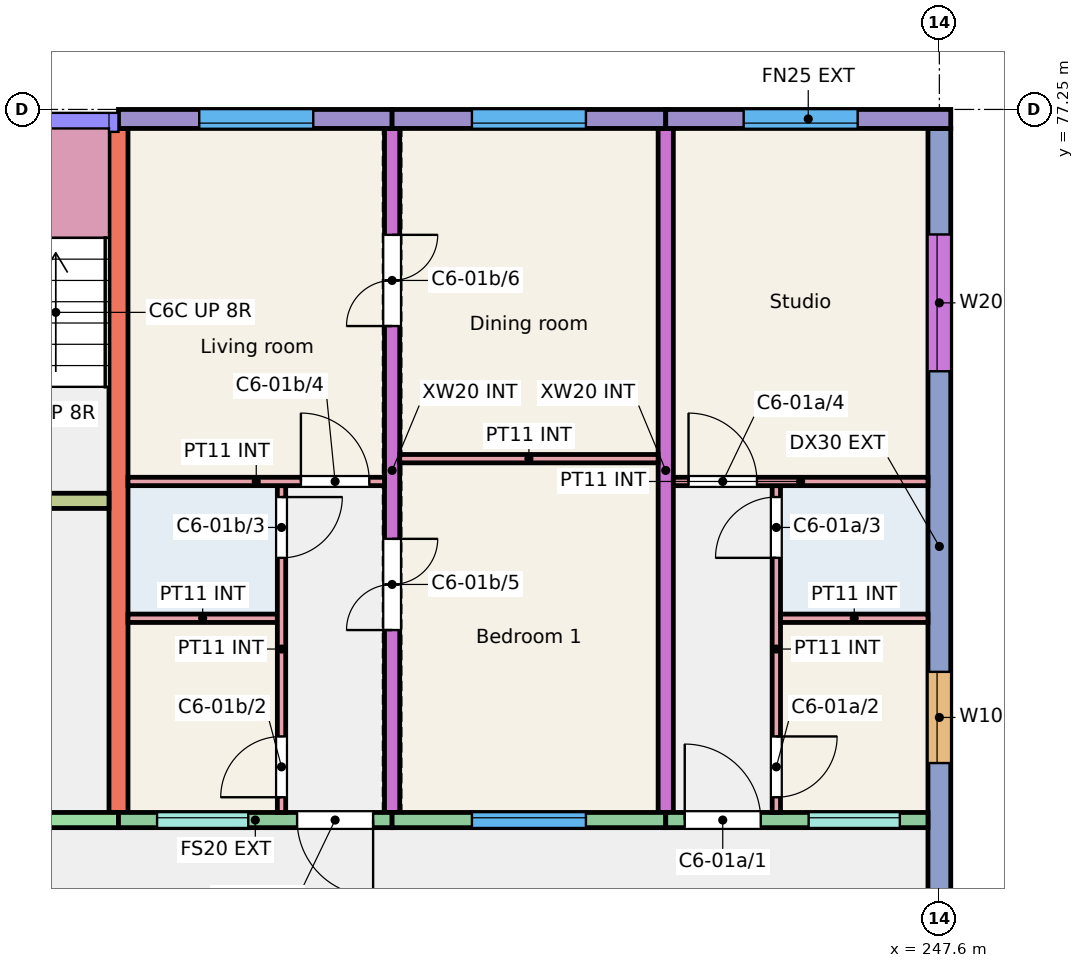
"""IFC4 building model, lengths in metres.
Left out: names, types, materials, properties, quantities, classifications, styles, units other than length and angle.
Written with IfcOpenShell. Run it as: python <this file> out.ifc"""

import sys

from ifc_helpers import new_model, si_unit, direction, frame, frame_2d, origin, place, context, subcontext, project, spatial, rectangle, extrude, element, fill, save


model = new_model("IFC4")
c1 = context("Model", 3, precision=1e-05, world=origin(), true_north=direction((0.0, 1.0)))
c2 = subcontext(c1, "Body", "Model", "MODEL_VIEW")
j1 = project(units=[si_unit("LENGTHUNIT", "METRE"), si_unit("PLANEANGLEUNIT", "RADIAN")], contexts=[c1])
p1 = place(None, origin())
s1 = spatial("IfcSite", under=j1, at=p1, CompositionType="ELEMENT")
p2 = place(p1, origin())
s2 = spatial("IfcBuilding", under=s1, at=p2, CompositionType="ELEMENT")
p3 = place(p2, frame((0.0, 0.0, 3.0)))
s3 = spatial("IfcBuildingStorey", under=s2, at=p3, CompositionType="ELEMENT", Elevation=3.0)
p4 = place(p3, frame((236.8, 68.0, 0.0), z_axis=(0.0, 0.0, 1.0), x_axis=(0.0, 1.0, 0.0)))
e1 = element("IfcWall", 1, at=p4, inside=s3, PredefinedType="SHEAR", context=c2, shape_type="SweptSolid", body=[
    extrude(rectangle(XDim=9.0, YDim=0.25, at=frame_2d((4.5, 0.0))), origin(), (0.0, 0.0, 1.0), 3.0),
])
p5 = place(p3, frame((240.4, 68.0, 0.0), z_axis=(0.0, 0.0, 1.0), x_axis=(0.0, 1.0, 0.0)))
e2 = element("IfcWall", 2, at=p5, inside=s3, PredefinedType="SHEAR", context=c2, shape_type="SweptSolid", body=[
    extrude(rectangle(XDim=9.0, YDim=0.2, at=frame_2d((4.5, 0.0))), origin(), (0.0, 0.0, 1.0), 3.0),
])
p6 = place(p5, frame((2.4, 0.0, 0.0)))
e3 = element("IfcOpeningElement", 3, at=p6, cuts=e2, PredefinedType="OPENING", context=c2, shape_type="SweptSolid", body=[
    extrude(rectangle(XDim=1.2, YDim=2.1, at=frame_2d((0.6, 1.05))), frame((0.0, 0.11, 0.0), z_axis=(0.0, -1.0, 0.0), x_axis=(1.0, 0.0, 0.0)), (0.0, 0.0, 1.0), 0.22),
])
p7 = place(p5, frame((6.4, 0.0, 0.0)))
e4 = element("IfcOpeningElement", 4, at=p7, cuts=e2, PredefinedType="OPENING", context=c2, shape_type="SweptSolid", body=[
    extrude(rectangle(XDim=1.2, YDim=2.1, at=frame_2d((0.6, 1.05))), frame((0.0, 0.11, 0.0), z_axis=(0.0, -1.0, 0.0), x_axis=(1.0, 0.0, 0.0)), (0.0, 0.0, 1.0), 0.22),
])
p8 = place(p3, frame((244.0, 68.0, 0.0), z_axis=(0.0, 0.0, 1.0), x_axis=(0.0, 1.0, 0.0)))
e5 = element("IfcWall", 5, at=p8, inside=s3, PredefinedType="SHEAR", context=c2, shape_type="SweptSolid", body=[
    extrude(rectangle(XDim=9.0, YDim=0.2, at=frame_2d((4.5, 0.0))), origin(), (0.0, 0.0, 1.0), 3.0),
])
p9 = place(p3, frame((247.6, 66.0, 0.0), z_axis=(0.0, 0.0, 1.0), x_axis=(0.0, 1.0, 0.0)))
e6 = element("IfcWall", 6, at=p9, inside=s3, PredefinedType="SHEAR", context=c2, shape_type="SweptSolid", body=[
    extrude(rectangle(XDim=11.0, YDim=0.3, at=frame_2d((5.5, 0.0))), origin(), (0.0, 0.0, 1.0), 3.0),
])
p10 = place(p9, frame((2.65, 0.0, 0.9)))
e7 = element("IfcOpeningElement", 7, at=p10, cuts=e6, PredefinedType="OPENING", context=c2, shape_type="SweptSolid", body=[
    extrude(rectangle(XDim=1.2, YDim=1.5, at=frame_2d((0.6, 0.75))), frame((0.0, 0.16, 0.0), z_axis=(0.0, -1.0, 0.0), x_axis=(1.0, 0.0, 0.0)), (0.0, 0.0, 1.0), 0.32),
])
p11 = place(p9, frame((7.805, 0.0, 0.9)))
e8 = element("IfcOpeningElement", 8, at=p11, cuts=e6, PredefinedType="OPENING", context=c2, shape_type="SweptSolid", body=[
    extrude(rectangle(XDim=1.8, YDim=1.5, at=frame_2d((0.9, 0.75))), frame((0.0, 0.16, 0.0), z_axis=(0.0, -1.0, 0.0), x_axis=(1.0, 0.0, 0.0)), (0.0, 0.0, 1.0), 0.32),
])
p12 = place(p3, frame((230.95, 67.9, 0.0), z_axis=(0.0, 0.0, 1.0), x_axis=(1.0, 0.0, 0.0)))
e9 = element("IfcWall", 9, at=p12, inside=s3, PredefinedType="SHEAR", context=c2, shape_type="SweptSolid", body=[
    extrude(rectangle(XDim=5.85, YDim=0.2, at=frame_2d((2.925, 0.0))), origin(), (0.0, 0.0, 1.0), 3.0),
])
p13 = place(p12, frame((2.312, 0.0, 0.0)))
e10 = element("IfcOpeningElement", 10, at=p13, cuts=e9, PredefinedType="OPENING", context=c2, shape_type="SweptSolid", body=[
    extrude(rectangle(XDim=1.1, YDim=2.1, at=frame_2d((0.55, 1.05))), frame((0.0, 0.11, 0.0), z_axis=(0.0, -1.0, 0.0), x_axis=(1.0, 0.0, 0.0)), (0.0, 0.0, 1.0), 0.22),
])
p14 = place(p3, frame((230.95, 72.1, 0.0), z_axis=(0.0, 0.0, 1.0), x_axis=(1.0, 0.0, 0.0)))
e11 = element("IfcWall", 11, at=p14, inside=s3, PredefinedType="SHEAR", context=c2, shape_type="SweptSolid", body=[
    extrude(rectangle(XDim=5.725, YDim=0.2, at=frame_2d((2.863, 0.0))), origin(), (0.0, 0.0, 1.0), 3.0),
])
p15 = place(p14, frame((3.775, 0.0, 0.0)))
e12 = element("IfcOpeningElement", 12, at=p15, cuts=e11, PredefinedType="OPENING", context=c2, shape_type="SweptSolid", body=[
    extrude(rectangle(XDim=1.0, YDim=2.1, at=frame_2d((0.5, 1.05))), frame((0.0, 0.11, 0.0), z_axis=(0.0, -1.0, 0.0), x_axis=(1.0, 0.0, 0.0)), (0.0, 0.0, 1.0), 0.22),
])
p16 = place(p14, frame((0.762, 0.0, 0.0)))
e13 = element("IfcOpeningElement", 13, at=p16, cuts=e11, PredefinedType="OPENING", context=c2, shape_type="SweptSolid", body=[
    extrude(rectangle(XDim=1.1, YDim=2.1, at=frame_2d((0.55, 1.05))), frame((0.0, 0.11, 0.0), z_axis=(0.0, -1.0, 0.0), x_axis=(1.0, 0.0, 0.0)), (0.0, 0.0, 1.0), 0.22),
])
p17 = place(p3, frame((236.8, 77.125, 0.0), z_axis=(0.0, 0.0, 1.0), x_axis=(1.0, 0.0, 0.0)))
e14 = element("IfcWall", 14, at=p17, inside=s3, PredefinedType="SOLIDWALL", context=c2, shape_type="SweptSolid", body=[
    extrude(rectangle(XDim=3.6, YDim=0.25, at=frame_2d((1.8, 0.0))), origin(), (0.0, 0.0, 1.0), 3.0),
])
p18 = place(p17, frame((1.062, 0.0, 0.9)))
e15 = element("IfcOpeningElement", 15, at=p18, cuts=e14, PredefinedType="OPENING", context=c2, shape_type="SweptSolid", body=[
    extrude(rectangle(XDim=1.5, YDim=1.5, at=frame_2d((0.75, 0.75))), frame((0.0, 0.135, 0.0), z_axis=(0.0, -1.0, 0.0), x_axis=(1.0, 0.0, 0.0)), (0.0, 0.0, 1.0), 0.27),
])
p19 = place(p3, frame((236.8, 67.9, 0.0), z_axis=(0.0, 0.0, 1.0), x_axis=(1.0, 0.0, 0.0)))
e16 = element("IfcWall", 16, at=p19, inside=s3, PredefinedType="SOLIDWALL", context=c2, shape_type="SweptSolid", body=[
    extrude(rectangle(XDim=3.6, YDim=0.2, at=frame_2d((1.8, 0.0))), origin(), (0.0, 0.0, 1.0), 3.0),
])
p20 = place(p19, frame((0.508, 0.0, 1.1)))
e17 = element("IfcOpeningElement", 17, at=p20, cuts=e16, PredefinedType="OPENING", context=c2, shape_type="SweptSolid", body=[
    extrude(rectangle(XDim=1.2, YDim=1.3, at=frame_2d((0.6, 0.65))), frame((0.0, 0.11, 0.0), z_axis=(0.0, -1.0, 0.0), x_axis=(1.0, 0.0, 0.0)), (0.0, 0.0, 1.0), 0.22),
])
p21 = place(p19, frame((2.35, 0.0, 0.0)))
e18 = element("IfcOpeningElement", 18, at=p21, cuts=e16, PredefinedType="OPENING", context=c2, shape_type="SweptSolid", body=[
    extrude(rectangle(XDim=1.0, YDim=2.1, at=frame_2d((0.5, 1.05))), frame((0.0, 0.11, 0.0), z_axis=(0.0, -1.0, 0.0), x_axis=(1.0, 0.0, 0.0)), (0.0, 0.0, 1.0), 0.22),
])
p22 = place(p3, frame((240.4, 77.125, 0.0), z_axis=(0.0, 0.0, 1.0), x_axis=(1.0, 0.0, 0.0)))
e19 = element("IfcWall", 19, at=p22, inside=s3, PredefinedType="SOLIDWALL", context=c2, shape_type="SweptSolid", body=[
    extrude(rectangle(XDim=3.6, YDim=0.25, at=frame_2d((1.8, 0.0))), origin(), (0.0, 0.0, 1.0), 3.0),
])
p23 = place(p22, frame((1.05, 0.0, 0.9)))
e20 = element("IfcOpeningElement", 20, at=p23, cuts=e19, PredefinedType="OPENING", context=c2, shape_type="SweptSolid", body=[
    extrude(rectangle(XDim=1.5, YDim=1.5, at=frame_2d((0.75, 0.75))), frame((0.0, 0.135, 0.0), z_axis=(0.0, -1.0, 0.0), x_axis=(1.0, 0.0, 0.0)), (0.0, 0.0, 1.0), 0.27),
])
p24 = place(p3, frame((240.4, 67.9, 0.0), z_axis=(0.0, 0.0, 1.0), x_axis=(1.0, 0.0, 0.0)))
e21 = element("IfcWall", 21, at=p24, inside=s3, PredefinedType="SOLIDWALL", context=c2, shape_type="SweptSolid", body=[
    extrude(rectangle(XDim=3.6, YDim=0.2, at=frame_2d((1.8, 0.0))), origin(), (0.0, 0.0, 1.0), 3.0),
])
p25 = place(p24, frame((1.05, 0.0, 0.9)))
e22 = element("IfcOpeningElement", 22, at=p25, cuts=e21, PredefinedType="OPENING", context=c2, shape_type="SweptSolid", body=[
    extrude(rectangle(XDim=1.5, YDim=1.5, at=frame_2d((0.75, 0.75))), frame((0.0, 0.11, 0.0), z_axis=(0.0, -1.0, 0.0), x_axis=(1.0, 0.0, 0.0)), (0.0, 0.0, 1.0), 0.22),
])
p26 = place(p3, frame((244.0, 77.125, 0.0), z_axis=(0.0, 0.0, 1.0), x_axis=(1.0, 0.0, 0.0)))
e23 = element("IfcWall", 23, at=p26, inside=s3, PredefinedType="SOLIDWALL", context=c2, shape_type="SweptSolid", body=[
    extrude(rectangle(XDim=3.75, YDim=0.25, at=frame_2d((1.875, 0.0))), origin(), (0.0, 0.0, 1.0), 3.0),
])
p27 = place(p26, frame((1.025, 0.0, 0.9)))
e24 = element("IfcOpeningElement", 24, at=p27, cuts=e23, PredefinedType="OPENING", context=c2, shape_type="SweptSolid", body=[
    extrude(rectangle(XDim=1.5, YDim=1.5, at=frame_2d((0.75, 0.75))), frame((0.0, 0.135, 0.0), z_axis=(0.0, -1.0, 0.0), x_axis=(1.0, 0.0, 0.0)), (0.0, 0.0, 1.0), 0.27),
])
p28 = place(p3, frame((244.0, 67.9, 0.0), z_axis=(0.0, 0.0, 1.0), x_axis=(1.0, 0.0, 0.0)))
e25 = element("IfcWall", 25, at=p28, inside=s3, PredefinedType="SOLIDWALL", context=c2, shape_type="SweptSolid", body=[
    extrude(rectangle(XDim=3.45, YDim=0.2, at=frame_2d((1.725, 0.0))), origin(), (0.0, 0.0, 1.0), 3.0),
])
p29 = place(p28, frame((1.88, 0.0, 1.1)))
e26 = element("IfcOpeningElement", 26, at=p29, cuts=e25, PredefinedType="OPENING", context=c2, shape_type="SweptSolid", body=[
    extrude(rectangle(XDim=1.2, YDim=1.3, at=frame_2d((0.6, 0.65))), frame((0.0, 0.11, 0.0), z_axis=(0.0, -1.0, 0.0), x_axis=(1.0, 0.0, 0.0)), (0.0, 0.0, 1.0), 0.22),
])
p30 = place(p28, frame((0.25, 0.0, 0.0)))
e27 = element("IfcOpeningElement", 27, at=p30, cuts=e25, PredefinedType="OPENING", context=c2, shape_type="SweptSolid", body=[
    extrude(rectangle(XDim=1.0, YDim=2.1, at=frame_2d((0.5, 1.05))), frame((0.0, 0.11, 0.0), z_axis=(0.0, -1.0, 0.0), x_axis=(1.0, 0.0, 0.0)), (0.0, 0.0, 1.0), 0.22),
])
p31 = place(p3, frame((245.455, 68.0, 0.0), z_axis=(0.0, 0.0, 1.0), x_axis=(0.0, 1.0, 0.0)))
e28 = element("IfcWall", 28, at=p31, inside=s3, PredefinedType="PARTITIONING", context=c2, shape_type="SweptSolid", body=[
    extrude(rectangle(XDim=4.3, YDim=0.11, at=frame_2d((2.15, 0.0))), origin(), (0.0, 0.0, 1.0), 2.8),
])
p32 = place(p31, frame((0.2, 0.0, 0.0)))
e29 = element("IfcOpeningElement", 29, at=p32, cuts=e28, PredefinedType="OPENING", context=c2, shape_type="SweptSolid", body=[
    extrude(rectangle(XDim=0.8, YDim=2.1, at=frame_2d((0.4, 1.05))), frame((0.0, 0.065, 0.0), z_axis=(0.0, -1.0, 0.0), x_axis=(1.0, 0.0, 0.0)), (0.0, 0.0, 1.0), 0.13),
])
p33 = place(p31, frame((3.35, 0.0, 0.0)))
e30 = element("IfcOpeningElement", 30, at=p33, cuts=e28, PredefinedType="OPENING", context=c2, shape_type="SweptSolid", body=[
    extrude(rectangle(XDim=0.8, YDim=2.1, at=frame_2d((0.4, 1.05))), frame((0.0, 0.065, 0.0), z_axis=(0.0, -1.0, 0.0), x_axis=(1.0, 0.0, 0.0)), (0.0, 0.0, 1.0), 0.13),
])
p34 = place(p3, frame((245.51, 70.555, 0.0), z_axis=(0.0, 0.0, 1.0), x_axis=(1.0, 0.0, 0.0)))
e31 = element("IfcWall", 31, at=p34, inside=s3, PredefinedType="PARTITIONING", context=c2, shape_type="SweptSolid", body=[
    extrude(rectangle(XDim=1.94, YDim=0.11, at=frame_2d((0.97, 0.0))), origin(), (0.0, 0.0, 1.0), 2.8),
])
p35 = place(p3, frame((244.1, 72.355, 0.0), z_axis=(0.0, 0.0, 1.0), x_axis=(1.0, 0.0, 0.0)))
e32 = element("IfcWall", 32, at=p35, inside=s3, PredefinedType="PARTITIONING", context=c2, shape_type="SweptSolid", body=[
    extrude(rectangle(XDim=3.35, YDim=0.11, at=frame_2d((1.675, 0.0))), origin(), (0.0, 0.0, 1.0), 2.8),
])
p36 = place(p35, frame((0.2, 0.0, 0.0)))
e33 = element("IfcOpeningElement", 33, at=p36, cuts=e32, PredefinedType="OPENING", context=c2, shape_type="SweptSolid", body=[
    extrude(rectangle(XDim=0.9, YDim=2.1, at=frame_2d((0.45, 1.05))), frame((0.0, 0.065, 0.0), z_axis=(0.0, -1.0, 0.0), x_axis=(1.0, 0.0, 0.0)), (0.0, 0.0, 1.0), 0.13),
])
p37 = place(p3, frame((236.925, 70.555, 0.0), z_axis=(0.0, 0.0, 1.0), x_axis=(1.0, 0.0, 0.0)))
e34 = element("IfcWall", 34, at=p37, inside=s3, PredefinedType="PARTITIONING", context=c2, shape_type="SweptSolid", body=[
    extrude(rectangle(XDim=1.965, YDim=0.11, at=frame_2d((0.982, 0.0))), origin(), (0.0, 0.0, 1.0), 2.8),
])
p38 = place(p3, frame((238.945, 68.0, 0.0), z_axis=(0.0, 0.0, 1.0), x_axis=(0.0, 1.0, 0.0)))
e35 = element("IfcWall", 35, at=p38, inside=s3, PredefinedType="PARTITIONING", context=c2, shape_type="SweptSolid", body=[
    extrude(rectangle(XDim=4.3, YDim=0.11, at=frame_2d((2.15, 0.0))), origin(), (0.0, 0.0, 1.0), 2.8),
])
p39 = place(p38, frame((0.2, 0.0, 0.0)))
e36 = element("IfcOpeningElement", 36, at=p39, cuts=e35, PredefinedType="OPENING", context=c2, shape_type="SweptSolid", body=[
    extrude(rectangle(XDim=0.8, YDim=2.1, at=frame_2d((0.4, 1.05))), frame((0.0, 0.065, 0.0), z_axis=(0.0, -1.0, 0.0), x_axis=(1.0, 0.0, 0.0)), (0.0, 0.0, 1.0), 0.13),
])
p40 = place(p38, frame((3.35, 0.0, 0.0)))
e37 = element("IfcOpeningElement", 37, at=p40, cuts=e35, PredefinedType="OPENING", context=c2, shape_type="SweptSolid", body=[
    extrude(rectangle(XDim=0.8, YDim=2.1, at=frame_2d((0.4, 1.05))), frame((0.0, 0.065, 0.0), z_axis=(0.0, -1.0, 0.0), x_axis=(1.0, 0.0, 0.0)), (0.0, 0.0, 1.0), 0.13),
])
p41 = place(p3, frame((236.925, 72.355, 0.0), z_axis=(0.0, 0.0, 1.0), x_axis=(1.0, 0.0, 0.0)))
e38 = element("IfcWall", 38, at=p41, inside=s3, PredefinedType="PARTITIONING", context=c2, shape_type="SweptSolid", body=[
    extrude(rectangle(XDim=3.375, YDim=0.11, at=frame_2d((1.688, 0.0))), origin(), (0.0, 0.0, 1.0), 2.8),
])
p42 = place(p41, frame((2.275, 0.0, 0.0)))
e39 = element("IfcOpeningElement", 39, at=p42, cuts=e38, PredefinedType="OPENING", context=c2, shape_type="SweptSolid", body=[
    extrude(rectangle(XDim=0.9, YDim=2.1, at=frame_2d((0.45, 1.05))), frame((0.0, 0.065, 0.0), z_axis=(0.0, -1.0, 0.0), x_axis=(1.0, 0.0, 0.0)), (0.0, 0.0, 1.0), 0.13),
])
p43 = place(p3, frame((240.5, 72.655, 0.0), z_axis=(0.0, 0.0, 1.0), x_axis=(1.0, 0.0, 0.0)))
e40 = element("IfcWall", 40, at=p43, inside=s3, PredefinedType="PARTITIONING", context=c2, shape_type="SweptSolid", body=[
    extrude(rectangle(XDim=3.4, YDim=0.11, at=frame_2d((1.7, 0.0))), origin(), (0.0, 0.0, 1.0), 2.8),
])
p44 = place(p29, origin())
e41 = element("IfcWindow", 41, at=p44, inside=s3, PartitioningType="SINGLE_PANEL", PredefinedType="WINDOW", context=c2, shape_type="SweptSolid", body=[
    extrude(rectangle(XDim=1.2, YDim=1.3, at=frame_2d((0.6, 0.65))), frame((0.0, 0.06, 0.0), z_axis=(0.0, -1.0, 0.0), x_axis=(1.0, 0.0, 0.0)), (0.0, 0.0, 1.0), 0.06),
])
fill(e26, e41)
p45 = place(p27, origin())
e42 = element("IfcWindow", 42, at=p45, inside=s3, PartitioningType="SINGLE_PANEL", PredefinedType="WINDOW", context=c2, shape_type="SweptSolid", body=[
    extrude(rectangle(XDim=1.5, YDim=1.5, at=frame_2d((0.75, 0.75))), frame((0.0, -0.025, 0.0), z_axis=(0.0, -1.0, 0.0), x_axis=(1.0, 0.0, 0.0)), (0.0, 0.0, 1.0), 0.06),
])
fill(e24, e42)
p46 = place(p10, origin())
e43 = element("IfcWindow", 43, at=p46, inside=s3, PartitioningType="SINGLE_PANEL", PredefinedType="WINDOW", context=c2, shape_type="SweptSolid", body=[
    extrude(rectangle(XDim=1.2, YDim=1.5, at=frame_2d((0.6, 0.75))), frame((0.0, 0.06, 0.0), z_axis=(0.0, -1.0, 0.0), x_axis=(1.0, 0.0, 0.0)), (0.0, 0.0, 1.0), 0.06),
])
fill(e7, e43)
p47 = place(p11, origin())
e44 = element("IfcWindow", 44, at=p47, inside=s3, PartitioningType="SINGLE_PANEL", PredefinedType="WINDOW", context=c2, shape_type="SweptSolid", body=[
    extrude(rectangle(XDim=1.8, YDim=1.5, at=frame_2d((0.9, 0.75))), frame((0.0, 0.06, 0.0), z_axis=(0.0, -1.0, 0.0), x_axis=(1.0, 0.0, 0.0)), (0.0, 0.0, 1.0), 0.06),
])
fill(e8, e44)
p48 = place(p25, origin())
e45 = element("IfcWindow", 45, at=p48, inside=s3, PartitioningType="SINGLE_PANEL", PredefinedType="WINDOW", context=c2, shape_type="SweptSolid", body=[
    extrude(rectangle(XDim=1.5, YDim=1.5, at=frame_2d((0.75, 0.75))), frame((0.0, 0.06, 0.0), z_axis=(0.0, -1.0, 0.0), x_axis=(1.0, 0.0, 0.0)), (0.0, 0.0, 1.0), 0.06),
])
fill(e22, e45)
p49 = place(p23, origin())
e46 = element("IfcWindow", 46, at=p49, inside=s3, PartitioningType="SINGLE_PANEL", PredefinedType="WINDOW", context=c2, shape_type="SweptSolid", body=[
    extrude(rectangle(XDim=1.5, YDim=1.5, at=frame_2d((0.75, 0.75))), frame((0.0, -0.025, 0.0), z_axis=(0.0, -1.0, 0.0), x_axis=(1.0, 0.0, 0.0)), (0.0, 0.0, 1.0), 0.06),
])
fill(e20, e46)
p50 = place(p20, origin())
e47 = element("IfcWindow", 47, at=p50, inside=s3, PartitioningType="SINGLE_PANEL", PredefinedType="WINDOW", context=c2, shape_type="SweptSolid", body=[
    extrude(rectangle(XDim=1.2, YDim=1.3, at=frame_2d((0.6, 0.65))), frame((0.0, 0.06, 0.0), z_axis=(0.0, -1.0, 0.0), x_axis=(1.0, 0.0, 0.0)), (0.0, 0.0, 1.0), 0.06),
])
fill(e17, e47)
p51 = place(p18, origin())
e48 = element("IfcWindow", 48, at=p51, inside=s3, PartitioningType="SINGLE_PANEL", PredefinedType="WINDOW", context=c2, shape_type="SweptSolid", body=[
    extrude(rectangle(XDim=1.5, YDim=1.5, at=frame_2d((0.75, 0.75))), frame((0.0, -0.025, 0.0), z_axis=(0.0, -1.0, 0.0), x_axis=(1.0, 0.0, 0.0)), (0.0, 0.0, 1.0), 0.06),
])
fill(e15, e48)
p52 = place(p30, origin())
e49 = element("IfcDoor", 49, at=p52, inside=s3, OperationType="SINGLE_SWING_LEFT", PredefinedType="DOOR", context=c2, shape_type="SweptSolid", body=[
    extrude(rectangle(XDim=1.0, YDim=2.1, at=frame_2d((0.5, 1.05))), frame((0.0, 0.025, 0.0), z_axis=(0.0, -1.0, 0.0), x_axis=(1.0, 0.0, 0.0)), (0.0, 0.0, 1.0), 0.05),
])
fill(e27, e49)
p53 = place(p32, origin())
e50 = element("IfcDoor", 50, at=p53, inside=s3, OperationType="SINGLE_SWING_RIGHT", PredefinedType="DOOR", context=c2, shape_type="SweptSolid", body=[
    extrude(rectangle(XDim=0.8, YDim=2.1, at=frame_2d((0.4, 1.05))), frame((0.0, 0.025, 0.0), z_axis=(0.0, -1.0, 0.0), x_axis=(1.0, 0.0, 0.0)), (0.0, 0.0, 1.0), 0.05),
])
fill(e29, e50)
p54 = place(p33, origin())
e51 = element("IfcDoor", 51, at=p54, inside=s3, OperationType="SINGLE_SWING_LEFT", PredefinedType="DOOR", context=c2, shape_type="SweptSolid", body=[
    extrude(rectangle(XDim=0.8, YDim=2.1, at=frame_2d((0.4, 1.05))), frame((0.0, 0.025, 0.0), z_axis=(0.0, -1.0, 0.0), x_axis=(1.0, 0.0, 0.0)), (0.0, 0.0, 1.0), 0.05),
])
fill(e30, e51)
p55 = place(p36, origin())
e52 = element("IfcDoor", 52, at=p55, inside=s3, OperationType="SINGLE_SWING_LEFT", PredefinedType="DOOR", context=c2, shape_type="SweptSolid", body=[
    extrude(rectangle(XDim=0.9, YDim=2.1, at=frame_2d((0.45, 1.05))), frame((0.0, 0.025, 0.0), z_axis=(0.0, -1.0, 0.0), x_axis=(1.0, 0.0, 0.0)), (0.0, 0.0, 1.0), 0.05),
])
fill(e33, e52)
p56 = place(p21, origin())
e53 = element("IfcDoor", 53, at=p56, inside=s3, OperationType="SINGLE_SWING_RIGHT", PredefinedType="DOOR", context=c2, shape_type="SweptSolid", body=[
    extrude(rectangle(XDim=1.0, YDim=2.1, at=frame_2d((0.5, 1.05))), frame((0.0, 0.025, 0.0), z_axis=(0.0, -1.0, 0.0), x_axis=(1.0, 0.0, 0.0)), (0.0, 0.0, 1.0), 0.05),
])
fill(e18, e53)
p57 = place(p39, origin())
e54 = element("IfcDoor", 54, at=p57, inside=s3, OperationType="SINGLE_SWING_LEFT", PredefinedType="DOOR", context=c2, shape_type="SweptSolid", body=[
    extrude(rectangle(XDim=0.8, YDim=2.1, at=frame_2d((0.4, 1.05))), frame((0.0, 0.025, 0.0), z_axis=(0.0, -1.0, 0.0), x_axis=(1.0, 0.0, 0.0)), (0.0, 0.0, 1.0), 0.05),
])
fill(e36, e54)
p58 = place(p40, origin())
e55 = element("IfcDoor", 55, at=p58, inside=s3, OperationType="SINGLE_SWING_RIGHT", PredefinedType="DOOR", context=c2, shape_type="SweptSolid", body=[
    extrude(rectangle(XDim=0.8, YDim=2.1, at=frame_2d((0.4, 1.05))), frame((0.0, 0.025, 0.0), z_axis=(0.0, -1.0, 0.0), x_axis=(1.0, 0.0, 0.0)), (0.0, 0.0, 1.0), 0.05),
])
fill(e37, e55)
p59 = place(p42, origin())
e56 = element("IfcDoor", 56, at=p59, inside=s3, OperationType="SINGLE_SWING_LEFT", PredefinedType="DOOR", context=c2, shape_type="SweptSolid", body=[
    extrude(rectangle(XDim=0.9, YDim=2.1, at=frame_2d((0.45, 1.05))), frame((0.0, 0.025, 0.0), z_axis=(0.0, -1.0, 0.0), x_axis=(1.0, 0.0, 0.0)), (0.0, 0.0, 1.0), 0.05),
])
fill(e39, e56)
p60 = place(p6, origin())
e57 = element("IfcDoor", 57, at=p60, inside=s3, OperationType="DOUBLE_DOOR_SINGLE_SWING", PredefinedType="DOOR", context=c2, shape_type="SweptSolid", body=[
    extrude(rectangle(XDim=1.2, YDim=2.1, at=frame_2d((0.6, 1.05))), frame((0.0, 0.025, 0.0), z_axis=(0.0, -1.0, 0.0), x_axis=(1.0, 0.0, 0.0)), (0.0, 0.0, 1.0), 0.05),
])
fill(e3, e57)
p61 = place(p7, origin())
e58 = element("IfcDoor", 58, at=p61, inside=s3, OperationType="DOUBLE_DOOR_SINGLE_SWING", PredefinedType="DOOR", context=c2, shape_type="SweptSolid", body=[
    extrude(rectangle(XDim=1.2, YDim=2.1, at=frame_2d((0.6, 1.05))), frame((0.0, 0.025, 0.0), z_axis=(0.0, -1.0, 0.0), x_axis=(1.0, 0.0, 0.0)), (0.0, 0.0, 1.0), 0.05),
])
fill(e4, e58)
save(model, sys.argv[1])
